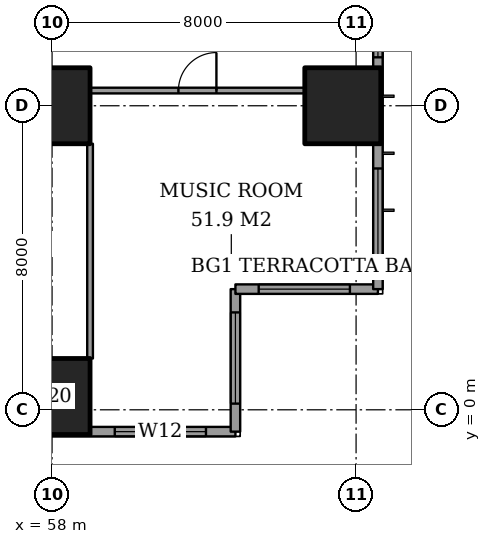
"""IFC4 building model, lengths in metres.
Left out: names, types, materials, properties, quantities, classifications, styles, units other than length and angle.
Written with IfcOpenShell. Run it as: python <this file> out.ifc"""

import sys

from ifc_helpers import new_model, si_unit, direction, frame, frame_2d, origin, origin_2d, place, context, subcontext, project, spatial, rectangle, extrude, element, fill, save


model = new_model("IFC4")
c1 = context("Model", 3, precision=1e-05, world=origin(), true_north=direction((0.0, 1.0)))
c2 = subcontext(c1, "Body", "Model", "MODEL_VIEW")
j1 = project(units=[si_unit("LENGTHUNIT", "METRE"), si_unit("PLANEANGLEUNIT", "RADIAN")], contexts=[c1])
p1 = place(None, origin())
s1 = spatial("IfcSite", under=j1, at=p1, CompositionType="ELEMENT")
p2 = place(p1, origin())
s2 = spatial("IfcBuilding", under=s1, at=p2, CompositionType="ELEMENT")
p3 = place(p2, frame((0.0, 0.0, 143.0)))
s3 = spatial("IfcBuildingStorey", under=s2, at=p3, CompositionType="ELEMENT", Elevation=143.0)
for number, where, z_axis, x_axis in (
    (1, (58.0, 0.35, 0.0), (0.0, 0.0, 1.0), (1.0, 0.0, 0.0)),
    (2, (58.0, 8.0, 0.0), (0.0, 0.0, 1.0), (1.0, 0.0, 0.0)),
    (3, (65.65, 8.0, 0.0), (0.0, 0.0, 1.0), (1.0, 0.0, 0.0)),
):
    element("IfcColumn", number, at=place(p3, frame(where, z_axis=z_axis, x_axis=x_axis)), inside=s3, PredefinedType="COLUMN", context=c2, shape_type="SweptSolid", body=[
        extrude(rectangle(XDim=2.0, YDim=2.0, at=origin_2d()), origin(), (0.0, 0.0, 1.0), 3.6),
    ])
p4 = place(p3, frame((41.425, -0.575, 0.0), z_axis=(0.0, 0.0, 1.0), x_axis=(1.0, 0.0, 0.0)))
e4 = element("IfcWall", 4, at=p4, inside=s3, PredefinedType="SOLIDWALL", context=c2, shape_type="SweptSolid", body=[
    extrude(rectangle(XDim=21.4, YDim=0.25, at=frame_2d((10.7, 0.0))), origin(), (0.0, 0.0, 1.0), 3.6),
])
p5 = place(p4, frame((3.05, 0.0, 0.4)))
e5 = element("IfcOpeningElement", 5, at=p5, cuts=e4, PredefinedType="OPENING", context=c2, shape_type="SweptSolid", body=[
    extrude(rectangle(XDim=2.4, YDim=2.2, at=frame_2d((1.2, 1.1))), frame((0.0, 0.135, 0.0), z_axis=(0.0, -1.0, 0.0), x_axis=(1.0, 0.0, 0.0)), (0.0, 0.0, 1.0), 0.27),
])
p6 = place(p4, frame((6.85, 0.0, 0.4)))
e6 = element("IfcOpeningElement", 6, at=p6, cuts=e4, PredefinedType="OPENING", context=c2, shape_type="SweptSolid", body=[
    extrude(rectangle(XDim=0.6, YDim=2.2, at=frame_2d((0.3, 1.1))), frame((0.0, 0.135, 0.0), z_axis=(0.0, -1.0, 0.0), x_axis=(1.0, 0.0, 0.0)), (0.0, 0.0, 1.0), 0.27),
])
p7 = place(p4, frame((9.975, 0.0, 0.4)))
e7 = element("IfcOpeningElement", 7, at=p7, cuts=e4, PredefinedType="OPENING", context=c2, shape_type="SweptSolid", body=[
    extrude(rectangle(XDim=1.2, YDim=2.2, at=frame_2d((0.6, 1.1))), frame((0.0, 0.135, 0.0), z_axis=(0.0, -1.0, 0.0), x_axis=(1.0, 0.0, 0.0)), (0.0, 0.0, 1.0), 0.27),
])
p8 = place(p4, frame((12.375, 0.0, 0.4)))
e8 = element("IfcOpeningElement", 8, at=p8, cuts=e4, PredefinedType="OPENING", context=c2, shape_type="SweptSolid", body=[
    extrude(rectangle(XDim=2.4, YDim=2.2, at=frame_2d((1.2, 1.1))), frame((0.0, 0.135, 0.0), z_axis=(0.0, -1.0, 0.0), x_axis=(1.0, 0.0, 0.0)), (0.0, 0.0, 1.0), 0.27),
])
p9 = place(p4, frame((18.225, 0.0, 0.4)))
e9 = element("IfcOpeningElement", 9, at=p9, cuts=e4, PredefinedType="OPENING", context=c2, shape_type="SweptSolid", body=[
    extrude(rectangle(XDim=2.4, YDim=2.2, at=frame_2d((1.2, 1.1))), frame((0.0, 0.135, 0.0), z_axis=(0.0, -1.0, 0.0), x_axis=(1.0, 0.0, 0.0)), (0.0, 0.0, 1.0), 0.27),
])
p10 = place(p3, frame((62.825, -0.575, 0.0), z_axis=(0.0, 0.0, 1.0), x_axis=(0.0, 1.0, 0.0)))
e10 = element("IfcWall", 10, at=p10, inside=s3, PredefinedType="SOLIDWALL", context=c2, shape_type="SweptSolid", body=[
    extrude(rectangle(XDim=3.75, YDim=0.25, at=frame_2d((1.875, 0.0))), origin(), (0.0, 0.0, 1.0), 3.6),
])
p11 = place(p10, frame((0.738, 0.0, 0.4)))
e11 = element("IfcOpeningElement", 11, at=p11, cuts=e10, PredefinedType="OPENING", context=c2, shape_type="SweptSolid", body=[
    extrude(rectangle(XDim=2.4, YDim=2.2, at=frame_2d((1.2, 1.1))), frame((0.0, 0.135, 0.0), z_axis=(0.0, -1.0, 0.0), x_axis=(1.0, 0.0, 0.0)), (0.0, 0.0, 1.0), 0.27),
])
p12 = place(p3, frame((62.825, 3.175, 0.0), z_axis=(0.0, 0.0, 1.0), x_axis=(1.0, 0.0, 0.0)))
e12 = element("IfcWall", 12, at=p12, inside=s3, PredefinedType="SOLIDWALL", context=c2, shape_type="SweptSolid", body=[
    extrude(rectangle(XDim=3.75, YDim=0.25, at=frame_2d((1.875, 0.0))), origin(), (0.0, 0.0, 1.0), 3.6),
])
p13 = place(p12, frame((0.613, 0.0, 0.4)))
e13 = element("IfcOpeningElement", 13, at=p13, cuts=e12, PredefinedType="OPENING", context=c2, shape_type="SweptSolid", body=[
    extrude(rectangle(XDim=2.4, YDim=2.2, at=frame_2d((1.2, 1.1))), frame((0.0, 0.135, 0.0), z_axis=(0.0, -1.0, 0.0), x_axis=(1.0, 0.0, 0.0)), (0.0, 0.0, 1.0), 0.27),
])
p14 = place(p3, frame((66.575, 3.175, 0.0), z_axis=(0.0, 0.0, 1.0), x_axis=(0.0, 1.0, 0.0)))
e14 = element("IfcWall", 14, at=p14, inside=s3, PredefinedType="SOLIDWALL", context=c2, shape_type="SweptSolid", body=[
    extrude(rectangle(XDim=41.65, YDim=0.25, at=frame_2d((20.825, 0.0))), origin(), (0.0, 0.0, 1.0), 3.6),
])
p15 = place(p14, frame((0.775, 0.0, 0.4)))
e15 = element("IfcOpeningElement", 15, at=p15, cuts=e14, PredefinedType="OPENING", context=c2, shape_type="SweptSolid", body=[
    extrude(rectangle(XDim=2.4, YDim=2.2, at=frame_2d((1.2, 1.1))), frame((0.0, 0.135, 0.0), z_axis=(0.0, -1.0, 0.0), x_axis=(1.0, 0.0, 0.0)), (0.0, 0.0, 1.0), 0.27),
])
p16 = place(p14, frame((6.1, 0.0, 0.4)))
e16 = element("IfcOpeningElement", 16, at=p16, cuts=e14, PredefinedType="OPENING", context=c2, shape_type="SweptSolid", body=[
    extrude(rectangle(XDim=1.2, YDim=2.2, at=frame_2d((0.6, 1.1))), frame((0.0, 0.135, 0.0), z_axis=(0.0, -1.0, 0.0), x_axis=(1.0, 0.0, 0.0)), (0.0, 0.0, 1.0), 0.27),
])
p17 = place(p14, frame((8.275, 0.0, 0.4)))
e17 = element("IfcOpeningElement", 17, at=p17, cuts=e14, PredefinedType="OPENING", context=c2, shape_type="SweptSolid", body=[
    extrude(rectangle(XDim=2.4, YDim=2.2, at=frame_2d((1.2, 1.1))), frame((0.0, 0.135, 0.0), z_axis=(0.0, -1.0, 0.0), x_axis=(1.0, 0.0, 0.0)), (0.0, 0.0, 1.0), 0.27),
])
p18 = place(p14, frame((15.775, 0.0, 0.4)))
e18 = element("IfcOpeningElement", 18, at=p18, cuts=e14, PredefinedType="OPENING", context=c2, shape_type="SweptSolid", body=[
    extrude(rectangle(XDim=2.4, YDim=2.2, at=frame_2d((1.2, 1.1))), frame((0.0, 0.135, 0.0), z_axis=(0.0, -1.0, 0.0), x_axis=(1.0, 0.0, 0.0)), (0.0, 0.0, 1.0), 0.27),
])
p19 = place(p14, frame((23.475, 0.0, 0.4)))
e19 = element("IfcOpeningElement", 19, at=p19, cuts=e14, PredefinedType="OPENING", context=c2, shape_type="SweptSolid", body=[
    extrude(rectangle(XDim=2.4, YDim=2.2, at=frame_2d((1.2, 1.1))), frame((0.0, 0.135, 0.0), z_axis=(0.0, -1.0, 0.0), x_axis=(1.0, 0.0, 0.0)), (0.0, 0.0, 1.0), 0.27),
])
p20 = place(p14, frame((30.875, 0.0, 0.4)))
e20 = element("IfcOpeningElement", 20, at=p20, cuts=e14, PredefinedType="OPENING", context=c2, shape_type="SweptSolid", body=[
    extrude(rectangle(XDim=2.4, YDim=2.2, at=frame_2d((1.2, 1.1))), frame((0.0, 0.135, 0.0), z_axis=(0.0, -1.0, 0.0), x_axis=(1.0, 0.0, 0.0)), (0.0, 0.0, 1.0), 0.27),
])
p21 = place(p14, frame((34.325, 0.0, 0.4)))
e21 = element("IfcOpeningElement", 21, at=p21, cuts=e14, PredefinedType="OPENING", context=c2, shape_type="SweptSolid", body=[
    extrude(rectangle(XDim=1.2, YDim=2.2, at=frame_2d((0.6, 1.1))), frame((0.0, 0.135, 0.0), z_axis=(0.0, -1.0, 0.0), x_axis=(1.0, 0.0, 0.0)), (0.0, 0.0, 1.0), 0.27),
])
p22 = place(p14, frame((38.475, 0.0, 0.4)))
e22 = element("IfcOpeningElement", 22, at=p22, cuts=e14, PredefinedType="OPENING", context=c2, shape_type="SweptSolid", body=[
    extrude(rectangle(XDim=2.4, YDim=2.2, at=frame_2d((1.2, 1.1))), frame((0.0, 0.135, 0.0), z_axis=(0.0, -1.0, 0.0), x_axis=(1.0, 0.0, 0.0)), (0.0, 0.0, 1.0), 0.27),
])
p23 = place(p3, frame((59.0, 8.4, 0.0), z_axis=(0.0, 0.0, 1.0), x_axis=(1.0, 0.0, 0.0)))
e23 = element("IfcWall", 23, at=p23, inside=s3, PredefinedType="PARTITIONING", context=c2, shape_type="SweptSolid", body=[
    extrude(rectangle(XDim=5.65, YDim=0.15, at=frame_2d((2.825, 0.0))), origin(), (0.0, 0.0, 1.0), 3.35),
])
p24 = place(p23, frame((2.325, 0.0, 0.0)))
e24 = element("IfcOpeningElement", 24, at=p24, cuts=e23, PredefinedType="OPENING", context=c2, shape_type="SweptSolid", body=[
    extrude(rectangle(XDim=1.0, YDim=2.1, at=frame_2d((0.5, 1.05))), frame((0.0, 0.085, 0.0), z_axis=(0.0, -1.0, 0.0), x_axis=(1.0, 0.0, 0.0)), (0.0, 0.0, 1.0), 0.17),
])
p25 = place(p3, frame((59.0, 1.35, 0.0), z_axis=(0.0, 0.0, 1.0), x_axis=(0.0, 1.0, 0.0)))
e25 = element("IfcWall", 25, at=p25, inside=s3, PredefinedType="PARTITIONING", context=c2, shape_type="SweptSolid", body=[
    extrude(rectangle(XDim=5.65, YDim=0.15, at=frame_2d((2.825, 0.0))), origin(), (0.0, 0.0, 1.0), 3.35),
])
p26 = place(p9, origin())
e26 = element("IfcWindow", 26, at=p26, inside=s3, PartitioningType="SINGLE_PANEL", PredefinedType="WINDOW", context=c2, shape_type="SweptSolid", body=[
    extrude(rectangle(XDim=2.4, YDim=2.2, at=frame_2d((1.2, 1.1))), frame((0.0, 0.03, 0.0), z_axis=(0.0, -1.0, 0.0), x_axis=(1.0, 0.0, 0.0)), (0.0, 0.0, 1.0), 0.06),
])
fill(e9, e26)
p27 = place(p11, origin())
e27 = element("IfcWindow", 27, at=p27, inside=s3, PartitioningType="SINGLE_PANEL", PredefinedType="WINDOW", context=c2, shape_type="SweptSolid", body=[
    extrude(rectangle(XDim=2.4, YDim=2.2, at=frame_2d((1.2, 1.1))), frame((0.0, 0.03, 0.0), z_axis=(0.0, -1.0, 0.0), x_axis=(1.0, 0.0, 0.0)), (0.0, 0.0, 1.0), 0.06),
])
fill(e11, e27)
p28 = place(p13, origin())
e28 = element("IfcWindow", 28, at=p28, inside=s3, PartitioningType="SINGLE_PANEL", PredefinedType="WINDOW", context=c2, shape_type="SweptSolid", body=[
    extrude(rectangle(XDim=2.4, YDim=2.2, at=frame_2d((1.2, 1.1))), frame((0.0, 0.03, 0.0), z_axis=(0.0, -1.0, 0.0), x_axis=(1.0, 0.0, 0.0)), (0.0, 0.0, 1.0), 0.06),
])
fill(e13, e28)
p29 = place(p15, origin())
e29 = element("IfcWindow", 29, at=p29, inside=s3, PartitioningType="SINGLE_PANEL", PredefinedType="WINDOW", context=c2, shape_type="SweptSolid", body=[
    extrude(rectangle(XDim=2.4, YDim=2.2, at=frame_2d((1.2, 1.1))), frame((0.0, 0.03, 0.0), z_axis=(0.0, -1.0, 0.0), x_axis=(1.0, 0.0, 0.0)), (0.0, 0.0, 1.0), 0.06),
])
fill(e15, e29)
p30 = place(p16, origin())
e30 = element("IfcWindow", 30, at=p30, inside=s3, PartitioningType="SINGLE_PANEL", PredefinedType="WINDOW", context=c2, shape_type="SweptSolid", body=[
    extrude(rectangle(XDim=1.2, YDim=2.2, at=frame_2d((0.6, 1.1))), frame((0.0, 0.03, 0.0), z_axis=(0.0, -1.0, 0.0), x_axis=(1.0, 0.0, 0.0)), (0.0, 0.0, 1.0), 0.06),
])
fill(e16, e30)
p31 = place(p24, origin())
e31 = element("IfcDoor", 31, at=p31, inside=s3, OperationType="SINGLE_SWING_LEFT", PredefinedType="DOOR", context=c2, shape_type="SweptSolid", body=[
    extrude(rectangle(XDim=1.0, YDim=2.1, at=frame_2d((0.5, 1.05))), frame((0.0, 0.025, 0.0), z_axis=(0.0, -1.0, 0.0), x_axis=(1.0, 0.0, 0.0)), (0.0, 0.0, 1.0), 0.05),
])
fill(e24, e31)
save(model, sys.argv[1])
